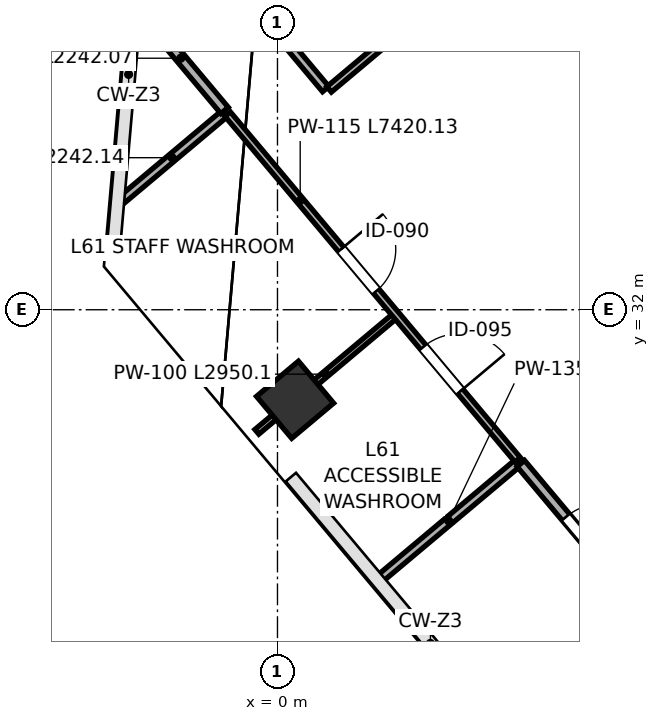
"""IFC4 building model, lengths in metres.
Left out: names, types, materials, properties, quantities, classifications, styles, units other than length and angle.
Written with IfcOpenShell. Run it as: python <this file> out.ifc"""

import sys

from ifc_helpers import new_model, si_unit, direction, frame, frame_2d, origin, origin_2d, place, context, subcontext, project, spatial, rectangle, extrude, source, transform, mapped, element, fill, save


model = new_model("IFC4")
c1 = context("Model", 3, precision=1e-05, world=origin(), true_north=direction((0.0, 1.0)))
c2 = subcontext(c1, "Body", "Model", "MODEL_VIEW")
j1 = project(units=[si_unit("LENGTHUNIT", "METRE"), si_unit("PLANEANGLEUNIT", "RADIAN")], contexts=[c1])
p1 = place(None, origin())
s1 = spatial("IfcSite", under=j1, at=p1, CompositionType="ELEMENT")
p2 = place(p1, origin())
s2 = spatial("IfcBuilding", under=s1, at=p2, CompositionType="ELEMENT")
p3 = place(p2, frame((0.0, 0.0, 271.0)))
s3 = spatial("IfcBuildingStorey", under=s2, at=p3, CompositionType="ELEMENT", Elevation=271.0)
m1 = source(origin(), c2, "Body", "SweptSolid", [
    extrude(rectangle(XDim=0.9, YDim=0.9, at=origin_2d()), origin(), (0.0, 0.0, 1.0), 4.198),
])
p4 = place(p3, frame((0.289, 30.52, 0.001), z_axis=(0.0, 0.0, 1.0), x_axis=(-0.642787609687, 0.766044443119, 0.0)))
e1 = element("IfcColumn", 1, at=p4, inside=s3, PredefinedType="COLUMN", context=c2, shape_type="MappedRepresentation", body=[
    mapped(m1, transform((0.0, 0.0, 0.0), scale=1.0)),
])
p5 = place(p3, frame((-2.593, 33.78, 0.0), z_axis=(0.0, 0.0, 1.0), x_axis=(0.765994359698, 0.642847292062, 0.0)))
e2 = element("IfcWall", 2, at=p5, inside=s3, PredefinedType="PARTITIONING", context=c2, shape_type="SweptSolid", body=[
    extrude(rectangle(XDim=2.242, YDim=0.135, at=frame_2d((1.121, 0.0))), origin(), (0.0, 0.0, 1.0), 3.96),
])
p6 = place(p3, frame((-2.312, 36.995, 0.0), z_axis=(0.0, 0.0, 1.0), x_axis=(0.642783398336, -0.766047976842, 0.0)))
e3 = element("IfcWall", 3, at=p6, inside=s3, PredefinedType="PARTITIONING", context=c2, shape_type="SweptSolid", body=[
    extrude(rectangle(XDim=2.242, YDim=0.16, at=frame_2d((1.121, 0.0))), origin(), (0.0, 0.0, 1.0), 3.96),
])
p7 = place(p3, frame((-0.339, 29.992, 0.0), z_axis=(0.0, 0.0, 1.0), x_axis=(0.766025914603, 0.642809690465, 0.0)))
e4 = element("IfcWall", 4, at=p7, inside=s3, PredefinedType="PARTITIONING", context=c2, shape_type="SweptSolid", body=[
    extrude(rectangle(XDim=2.95, YDim=0.1, at=frame_2d((1.475, 0.0))), origin(), (0.0, 0.0, 1.0), 3.195),
])
p8 = place(p3, frame((1.686, 27.58, 0.0), z_axis=(0.0, 0.0, 1.0), x_axis=(0.766107411761, 0.642712559116, 0.0)))
e5 = element("IfcWall", 5, at=p8, inside=s3, PredefinedType="PARTITIONING", context=c2, shape_type="SweptSolid", body=[
    extrude(rectangle(XDim=2.95, YDim=0.135, at=frame_2d((1.475, 0.0))), origin(), (0.0, 0.0, 1.0), 3.195),
])
p9 = place(p3, frame((-0.819, 35.216, 0.0), z_axis=(0.0, 0.0, 1.0), x_axis=(0.642772999209, -0.766056702528, 0.0)))
e6 = element("IfcWall", 6, at=p9, inside=s3, PredefinedType="PARTITIONING", context=c2, shape_type="SweptSolid", body=[
    extrude(rectangle(XDim=7.42, YDim=0.115, at=frame_2d((3.71, 0.0))), origin(), (0.0, 0.0, 1.0), 3.96),
])
p10 = place(p9, frame((2.9, 0.0, 0.0)))
e7 = element("IfcOpeningElement", 7, at=p10, cuts=e6, PredefinedType="OPENING", context=c2, shape_type="SweptSolid", body=[
    extrude(rectangle(XDim=0.9, YDim=2.15, at=frame_2d((0.45, 1.075))), frame((0.0, 0.067, 0.0), z_axis=(0.0, -1.0, 0.0), x_axis=(1.0, 0.0, 0.0)), (0.0, 0.0, 1.0), 0.135),
])
p11 = place(p9, frame((5.0, 0.0, 0.0)))
e8 = element("IfcOpeningElement", 8, at=p11, cuts=e6, PredefinedType="OPENING", context=c2, shape_type="SweptSolid", body=[
    extrude(rectangle(XDim=0.95, YDim=2.15, at=frame_2d((0.475, 1.075))), frame((0.0, 0.067, 0.0), z_axis=(0.0, -1.0, 0.0), x_axis=(1.0, 0.0, 0.0)), (0.0, 0.0, 1.0), 0.135),
])
p12 = place(p3, frame((4.002, 29.471, 0.0), z_axis=(0.0, 0.0, 1.0), x_axis=(0.642802048813, -0.766032327021, 0.0)))
e9 = element("IfcWall", 9, at=p12, inside=s3, PredefinedType="PARTITIONING", context=c2, shape_type="SweptSolid", body=[
    extrude(rectangle(XDim=11.57, YDim=0.16, at=frame_2d((5.785, 0.0))), origin(), (0.0, 0.0, 1.0), 3.96),
])
p13 = place(p12, frame((1.15, 0.0, 0.0)))
e10 = element("IfcOpeningElement", 10, at=p13, cuts=e9, PredefinedType="OPENING", context=c2, shape_type="SweptSolid", body=[
    extrude(rectangle(XDim=0.95, YDim=2.15, at=frame_2d((0.475, 1.075))), frame((0.0, 0.09, 0.0), z_axis=(0.0, -1.0, 0.0), x_axis=(1.0, 0.0, 0.0)), (0.0, 0.0, 1.0), 0.18),
])
p14 = place(p3, frame((-2.055, 39.022, 0.0), z_axis=(0.0, 0.0, 1.0), x_axis=(0.642777132802, -0.766053234147, 0.0)))
e11 = element("IfcWall", 11, at=p14, inside=s3, PredefinedType="PARTITIONING", context=c2, shape_type="SweptSolid", body=[
    extrude(rectangle(XDim=4.43, YDim=0.135, at=frame_2d((2.215, 0.0))), origin(), (0.0, 0.0, 1.0), 3.96),
])
p15 = place(p3, frame((0.849, 35.624, 0.0), z_axis=(0.0, 0.0, 1.0), x_axis=(0.766042777978, 0.642789594119, 0.0)))
e12 = element("IfcWall", 12, at=p15, inside=s3, PredefinedType="PARTITIONING", context=c2, shape_type="SweptSolid", body=[
    extrude(rectangle(XDim=29.51, YDim=0.115, at=frame_2d((14.755, 0.0))), origin(), (0.0, 0.0, 1.0), 3.96),
])
p16 = place(p15, frame((2.6, 0.0, 0.0)))
e13 = element("IfcOpeningElement", 13, at=p16, cuts=e12, PredefinedType="OPENING", context=c2, shape_type="SweptSolid", body=[
    extrude(rectangle(XDim=0.95, YDim=2.15, at=frame_2d((0.475, 1.075))), frame((0.0, 0.067, 0.0), z_axis=(0.0, -1.0, 0.0), x_axis=(1.0, 0.0, 0.0)), (0.0, 0.0, 1.0), 0.135),
])
m2 = source(origin(), c2, "Body", "SweptSolid", [
    extrude(rectangle(XDim=0.9, YDim=2.15, at=frame_2d((0.45, 1.075))), frame((0.0, 0.025, 0.0), z_axis=(0.0, -1.0, 0.0), x_axis=(1.0, 0.0, 0.0)), (0.0, 0.0, 1.0), 0.05),
])
p17 = place(p10, origin())
e14 = element("IfcDoor", 14, at=p17, inside=s3, OperationType="SINGLE_SWING_LEFT", PredefinedType="DOOR", context=c2, shape_type="MappedRepresentation", body=[
    mapped(m2, transform((0.0, 0.0, 0.0), scale=1.0)),
])
fill(e7, e14)
m3 = source(origin(), c2, "Body", "SweptSolid", [
    extrude(rectangle(XDim=0.95, YDim=2.15, at=frame_2d((0.475, 1.075))), frame((0.0, 0.025, 0.0), z_axis=(0.0, -1.0, 0.0), x_axis=(1.0, 0.0, 0.0)), (0.0, 0.0, 1.0), 0.05),
])
p18 = place(p11, origin())
e15 = element("IfcDoor", 15, at=p18, inside=s3, OperationType="SINGLE_SWING_RIGHT", PredefinedType="DOOR", context=c2, shape_type="MappedRepresentation", body=[
    mapped(m3, transform((0.0, 0.0, 0.0), scale=1.0)),
])
fill(e8, e15)
m4 = source(origin(), c2, "Body", "SweptSolid", [
    extrude(rectangle(XDim=0.95, YDim=2.15, at=frame_2d((0.475, 1.075))), frame((0.0, 0.025, 0.0), z_axis=(0.0, -1.0, 0.0), x_axis=(1.0, 0.0, 0.0)), (0.0, 0.0, 1.0), 0.05),
])
p19 = place(p13, origin())
e16 = element("IfcDoor", 16, at=p19, inside=s3, OperationType="SINGLE_SWING_RIGHT", PredefinedType="DOOR", context=c2, shape_type="MappedRepresentation", body=[
    mapped(m4, transform((0.0, 0.0, 0.0), scale=1.0)),
])
fill(e10, e16)
save(model, sys.argv[1])
